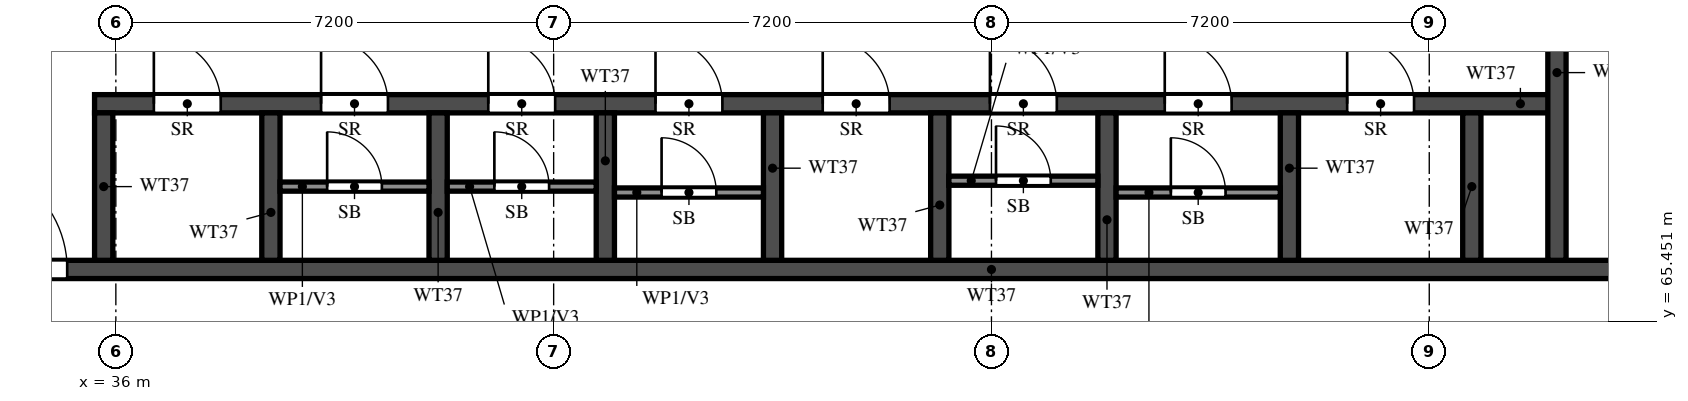
"""IFC4 building model, lengths in metres.
Left out: names, types, materials, properties, quantities, classifications, styles, units other than length and angle.
Written with IfcOpenShell. Run it as: python <this file> out.ifc"""

import sys

from ifc_helpers import new_model, si_unit, direction, frame, frame_2d, origin, place, context, subcontext, project, spatial, rectangle, extrude, element, fill, save


model = new_model("IFC4")
c1 = context("Model", 3, precision=1e-05, world=origin(), true_north=direction((0.0, 1.0)))
c2 = subcontext(c1, "Body", "Model", "MODEL_VIEW")
j1 = project(units=[si_unit("LENGTHUNIT", "METRE"), si_unit("PLANEANGLEUNIT", "RADIAN")], contexts=[c1])
p1 = place(None, origin())
s1 = spatial("IfcSite", under=j1, at=p1, CompositionType="ELEMENT")
p2 = place(p1, origin())
s2 = spatial("IfcBuilding", under=s1, at=p2, CompositionType="ELEMENT")
p3 = place(p2, frame((0.0, 0.0, 215.0)))
s3 = spatial("IfcBuildingStorey", under=s2, at=p3, CompositionType="ELEMENT", Elevation=215.0)
p4 = place(p3, frame((29.2, 66.3, 0.0), z_axis=(0.0, 0.0, 1.0), x_axis=(1.0, 0.0, 0.0)))
e1 = element("IfcWall", 1, at=p4, inside=s3, PredefinedType="SHEAR", context=c2, shape_type="SweptSolid", body=[
    extrude(rectangle(XDim=42.4, YDim=0.3, at=frame_2d((21.2, 0.0))), origin(), (0.0, 0.0, 1.0), 3.22),
])
p5 = place(p4, frame((1.425, 0.0, 0.0)))
e2 = element("IfcOpeningElement", 2, at=p5, cuts=e1, PredefinedType="OPENING", context=c2, shape_type="SweptSolid", body=[
    extrude(rectangle(XDim=1.1, YDim=2.1, at=frame_2d((0.55, 1.05))), frame((0.0, 0.16, 0.0), z_axis=(0.0, -1.0, 0.0), x_axis=(1.0, 0.0, 0.0)), (0.0, 0.0, 1.0), 0.32),
])
p6 = place(p4, frame((4.2, 0.0, 0.0)))
e3 = element("IfcOpeningElement", 3, at=p6, cuts=e1, PredefinedType="OPENING", context=c2, shape_type="SweptSolid", body=[
    extrude(rectangle(XDim=1.8, YDim=2.1, at=frame_2d((0.9, 1.05))), frame((0.0, 0.16, 0.0), z_axis=(0.0, -1.0, 0.0), x_axis=(1.0, 0.0, 0.0)), (0.0, 0.0, 1.0), 0.32),
])
p7 = place(p3, frame((35.65, 69.025, 0.0), z_axis=(0.0, 0.0, 1.0), x_axis=(1.0, 0.0, 0.0)))
e4 = element("IfcWall", 4, at=p7, inside=s3, PredefinedType="SHEAR", context=c2, shape_type="SweptSolid", body=[
    extrude(rectangle(XDim=24.05, YDim=0.3, at=frame_2d((12.025, 0.0))), origin(), (0.0, 0.0, 1.0), 3.22),
])
p8 = place(p7, frame((0.975, 0.0, 0.0)))
e5 = element("IfcOpeningElement", 5, at=p8, cuts=e4, PredefinedType="OPENING", context=c2, shape_type="SweptSolid", body=[
    extrude(rectangle(XDim=1.1, YDim=2.1, at=frame_2d((0.55, 1.05))), frame((0.0, 0.16, 0.0), z_axis=(0.0, -1.0, 0.0), x_axis=(1.0, 0.0, 0.0)), (0.0, 0.0, 1.0), 0.32),
])
p9 = place(p7, frame((3.725, 0.0, 0.0)))
e6 = element("IfcOpeningElement", 6, at=p9, cuts=e4, PredefinedType="OPENING", context=c2, shape_type="SweptSolid", body=[
    extrude(rectangle(XDim=1.1, YDim=2.1, at=frame_2d((0.55, 1.05))), frame((0.0, 0.16, 0.0), z_axis=(0.0, -1.0, 0.0), x_axis=(1.0, 0.0, 0.0)), (0.0, 0.0, 1.0), 0.32),
])
p10 = place(p7, frame((6.475, 0.0, 0.0)))
e7 = element("IfcOpeningElement", 7, at=p10, cuts=e4, PredefinedType="OPENING", context=c2, shape_type="SweptSolid", body=[
    extrude(rectangle(XDim=1.1, YDim=2.1, at=frame_2d((0.55, 1.05))), frame((0.0, 0.16, 0.0), z_axis=(0.0, -1.0, 0.0), x_axis=(1.0, 0.0, 0.0)), (0.0, 0.0, 1.0), 0.32),
])
p11 = place(p7, frame((9.225, 0.0, 0.0)))
e8 = element("IfcOpeningElement", 8, at=p11, cuts=e4, PredefinedType="OPENING", context=c2, shape_type="SweptSolid", body=[
    extrude(rectangle(XDim=1.1, YDim=2.1, at=frame_2d((0.55, 1.05))), frame((0.0, 0.16, 0.0), z_axis=(0.0, -1.0, 0.0), x_axis=(1.0, 0.0, 0.0)), (0.0, 0.0, 1.0), 0.32),
])
p12 = place(p7, frame((11.975, 0.0, 0.0)))
e9 = element("IfcOpeningElement", 9, at=p12, cuts=e4, PredefinedType="OPENING", context=c2, shape_type="SweptSolid", body=[
    extrude(rectangle(XDim=1.1, YDim=2.1, at=frame_2d((0.55, 1.05))), frame((0.0, 0.16, 0.0), z_axis=(0.0, -1.0, 0.0), x_axis=(1.0, 0.0, 0.0)), (0.0, 0.0, 1.0), 0.32),
])
p13 = place(p7, frame((14.725, 0.0, 0.0)))
e10 = element("IfcOpeningElement", 10, at=p13, cuts=e4, PredefinedType="OPENING", context=c2, shape_type="SweptSolid", body=[
    extrude(rectangle(XDim=1.1, YDim=2.1, at=frame_2d((0.55, 1.05))), frame((0.0, 0.16, 0.0), z_axis=(0.0, -1.0, 0.0), x_axis=(1.0, 0.0, 0.0)), (0.0, 0.0, 1.0), 0.32),
])
p14 = place(p7, frame((17.6, 0.0, 0.0)))
e11 = element("IfcOpeningElement", 11, at=p14, cuts=e4, PredefinedType="OPENING", context=c2, shape_type="SweptSolid", body=[
    extrude(rectangle(XDim=1.1, YDim=2.1, at=frame_2d((0.55, 1.05))), frame((0.0, 0.16, 0.0), z_axis=(0.0, -1.0, 0.0), x_axis=(1.0, 0.0, 0.0)), (0.0, 0.0, 1.0), 0.32),
])
p15 = place(p7, frame((20.6, 0.0, 0.0)))
e12 = element("IfcOpeningElement", 12, at=p15, cuts=e4, PredefinedType="OPENING", context=c2, shape_type="SweptSolid", body=[
    extrude(rectangle(XDim=1.1, YDim=2.1, at=frame_2d((0.55, 1.05))), frame((0.0, 0.16, 0.0), z_axis=(0.0, -1.0, 0.0), x_axis=(1.0, 0.0, 0.0)), (0.0, 0.0, 1.0), 0.32),
])
p16 = place(p3, frame((59.7, 66.45, 0.0), z_axis=(0.0, 0.0, 1.0), x_axis=(0.0, 1.0, 0.0)))
e13 = element("IfcWall", 13, at=p16, inside=s3, PredefinedType="SHEAR", context=c2, shape_type="SweptSolid", body=[
    extrude(rectangle(XDim=6.175, YDim=0.3, at=frame_2d((3.087, 0.0))), origin(), (0.0, 0.0, 1.0), 3.22),
])
p17 = place(p16, frame((3.85, 0.0, 0.0)))
e14 = element("IfcOpeningElement", 14, at=p17, cuts=e13, PredefinedType="OPENING", context=c2, shape_type="SweptSolid", body=[
    extrude(rectangle(XDim=1.2, YDim=2.1, at=frame_2d((0.6, 1.05))), frame((0.0, 0.16, 0.0), z_axis=(0.0, -1.0, 0.0), x_axis=(1.0, 0.0, 0.0)), (0.0, 0.0, 1.0), 0.32),
])
for number, where, z_axis, x_axis in (
    (15, (35.8, 66.45, 0.0), (0.0, 0.0, 1.0), (0.0, 1.0, 0.0)),
    (16, (38.55, 66.45, 0.0), (0.0, 0.0, 1.0), (0.0, 1.0, 0.0)),
    (17, (41.3, 66.45, 0.0), (0.0, 0.0, 1.0), (0.0, 1.0, 0.0)),
    (18, (44.05, 66.45, 0.0), (0.0, 0.0, 1.0), (0.0, 1.0, 0.0)),
    (19, (46.8, 66.45, 0.0), (0.0, 0.0, 1.0), (0.0, 1.0, 0.0)),
    (20, (49.55, 66.45, 0.0), (0.0, 0.0, 1.0), (0.0, 1.0, 0.0)),
    (21, (52.3, 66.45, 0.0), (0.0, 0.0, 1.0), (0.0, 1.0, 0.0)),
    (22, (55.3, 66.45, 0.0), (0.0, 0.0, 1.0), (0.0, 1.0, 0.0)),
    (23, (58.3, 66.45, 0.0), (0.0, 0.0, 1.0), (0.0, 1.0, 0.0)),
):
    element("IfcWall", number, at=place(p3, frame(where, z_axis=z_axis, x_axis=x_axis)), inside=s3, PredefinedType="SHEAR", context=c2, shape_type="SweptSolid", body=[
        extrude(rectangle(XDim=2.425, YDim=0.3, at=frame_2d((1.212, 0.0))), origin(), (0.0, 0.0, 1.0), 3.22),
    ])
p18 = place(p3, frame((38.7, 67.663, 0.0), z_axis=(0.0, 0.0, 1.0), x_axis=(1.0, 0.0, 0.0)))
e24 = element("IfcWall", 24, at=p18, inside=s3, PredefinedType="PARTITIONING", context=c2, shape_type="SweptSolid", body=[
    extrude(rectangle(XDim=2.45, YDim=0.15, at=frame_2d((1.225, 0.0))), origin(), (0.0, 0.0, 1.0), 3.22),
])
p19 = place(p18, frame((0.775, 0.0, 0.0)))
e25 = element("IfcOpeningElement", 25, at=p19, cuts=e24, PredefinedType="OPENING", context=c2, shape_type="SweptSolid", body=[
    extrude(rectangle(XDim=0.9, YDim=2.1, at=frame_2d((0.45, 1.05))), frame((0.0, 0.085, 0.0), z_axis=(0.0, -1.0, 0.0), x_axis=(1.0, 0.0, 0.0)), (0.0, 0.0, 1.0), 0.17),
])
p20 = place(p3, frame((41.45, 67.663, 0.0), z_axis=(0.0, 0.0, 1.0), x_axis=(1.0, 0.0, 0.0)))
e26 = element("IfcWall", 26, at=p20, inside=s3, PredefinedType="PARTITIONING", context=c2, shape_type="SweptSolid", body=[
    extrude(rectangle(XDim=2.45, YDim=0.15, at=frame_2d((1.225, 0.0))), origin(), (0.0, 0.0, 1.0), 3.22),
])
p21 = place(p20, frame((0.775, 0.0, 0.0)))
e27 = element("IfcOpeningElement", 27, at=p21, cuts=e26, PredefinedType="OPENING", context=c2, shape_type="SweptSolid", body=[
    extrude(rectangle(XDim=0.9, YDim=2.1, at=frame_2d((0.45, 1.05))), frame((0.0, 0.085, 0.0), z_axis=(0.0, -1.0, 0.0), x_axis=(1.0, 0.0, 0.0)), (0.0, 0.0, 1.0), 0.17),
])
p22 = place(p3, frame((44.2, 67.565, 0.0), z_axis=(0.0, 0.0, 1.0), x_axis=(1.0, 0.0, 0.0)))
e28 = element("IfcWall", 28, at=p22, inside=s3, PredefinedType="PARTITIONING", context=c2, shape_type="SweptSolid", body=[
    extrude(rectangle(XDim=2.45, YDim=0.15, at=frame_2d((1.225, 0.0))), origin(), (0.0, 0.0, 1.0), 3.22),
])
p23 = place(p22, frame((0.775, 0.0, 0.0)))
e29 = element("IfcOpeningElement", 29, at=p23, cuts=e28, PredefinedType="OPENING", context=c2, shape_type="SweptSolid", body=[
    extrude(rectangle(XDim=0.9, YDim=2.1, at=frame_2d((0.45, 1.05))), frame((0.0, 0.085, 0.0), z_axis=(0.0, -1.0, 0.0), x_axis=(1.0, 0.0, 0.0)), (0.0, 0.0, 1.0), 0.17),
])
p24 = place(p3, frame((49.7, 67.76, 0.0), z_axis=(0.0, 0.0, 1.0), x_axis=(1.0, 0.0, 0.0)))
e30 = element("IfcWall", 30, at=p24, inside=s3, PredefinedType="PARTITIONING", context=c2, shape_type="SweptSolid", body=[
    extrude(rectangle(XDim=2.45, YDim=0.15, at=frame_2d((1.225, 0.0))), origin(), (0.0, 0.0, 1.0), 3.22),
])
p25 = place(p24, frame((0.775, 0.0, 0.0)))
e31 = element("IfcOpeningElement", 31, at=p25, cuts=e30, PredefinedType="OPENING", context=c2, shape_type="SweptSolid", body=[
    extrude(rectangle(XDim=0.9, YDim=2.1, at=frame_2d((0.45, 1.05))), frame((0.0, 0.085, 0.0), z_axis=(0.0, -1.0, 0.0), x_axis=(1.0, 0.0, 0.0)), (0.0, 0.0, 1.0), 0.17),
])
p26 = place(p3, frame((52.45, 67.565, 0.0), z_axis=(0.0, 0.0, 1.0), x_axis=(1.0, 0.0, 0.0)))
e32 = element("IfcWall", 32, at=p26, inside=s3, PredefinedType="PARTITIONING", context=c2, shape_type="SweptSolid", body=[
    extrude(rectangle(XDim=2.7, YDim=0.15, at=frame_2d((1.35, 0.0))), origin(), (0.0, 0.0, 1.0), 3.22),
])
p27 = place(p26, frame((0.9, 0.0, 0.0)))
e33 = element("IfcOpeningElement", 33, at=p27, cuts=e32, PredefinedType="OPENING", context=c2, shape_type="SweptSolid", body=[
    extrude(rectangle(XDim=0.9, YDim=2.1, at=frame_2d((0.45, 1.05))), frame((0.0, 0.085, 0.0), z_axis=(0.0, -1.0, 0.0), x_axis=(1.0, 0.0, 0.0)), (0.0, 0.0, 1.0), 0.17),
])
p28 = place(p6, origin())
e34 = element("IfcDoor", 34, at=p28, inside=s3, OperationType="DOUBLE_DOOR_SINGLE_SWING", PredefinedType="DOOR", context=c2, shape_type="SweptSolid", body=[
    extrude(rectangle(XDim=1.8, YDim=2.1, at=frame_2d((0.9, 1.05))), frame((0.0, 0.025, 0.0), z_axis=(0.0, -1.0, 0.0), x_axis=(1.0, 0.0, 0.0)), (0.0, 0.0, 1.0), 0.05),
])
fill(e3, e34)
p29 = place(p8, origin())
e35 = element("IfcDoor", 35, at=p29, inside=s3, OperationType="SINGLE_SWING_RIGHT", PredefinedType="DOOR", context=c2, shape_type="SweptSolid", body=[
    extrude(rectangle(XDim=1.1, YDim=2.1, at=frame_2d((0.55, 1.05))), frame((0.0, 0.025, 0.0), z_axis=(0.0, -1.0, 0.0), x_axis=(1.0, 0.0, 0.0)), (0.0, 0.0, 1.0), 0.05),
])
fill(e5, e35)
p30 = place(p9, origin())
e36 = element("IfcDoor", 36, at=p30, inside=s3, OperationType="SINGLE_SWING_LEFT", PredefinedType="DOOR", context=c2, shape_type="SweptSolid", body=[
    extrude(rectangle(XDim=1.1, YDim=2.1, at=frame_2d((0.55, 1.05))), frame((0.0, 0.025, 0.0), z_axis=(0.0, -1.0, 0.0), x_axis=(1.0, 0.0, 0.0)), (0.0, 0.0, 1.0), 0.05),
])
fill(e6, e36)
p31 = place(p19, origin())
e37 = element("IfcDoor", 37, at=p31, inside=s3, OperationType="SINGLE_SWING_LEFT", PredefinedType="DOOR", context=c2, shape_type="SweptSolid", body=[
    extrude(rectangle(XDim=0.9, YDim=2.1, at=frame_2d((0.45, 1.05))), frame((0.0, 0.025, 0.0), z_axis=(0.0, -1.0, 0.0), x_axis=(1.0, 0.0, 0.0)), (0.0, 0.0, 1.0), 0.05),
])
fill(e25, e37)
p32 = place(p10, origin())
e38 = element("IfcDoor", 38, at=p32, inside=s3, OperationType="SINGLE_SWING_RIGHT", PredefinedType="DOOR", context=c2, shape_type="SweptSolid", body=[
    extrude(rectangle(XDim=1.1, YDim=2.1, at=frame_2d((0.55, 1.05))), frame((0.0, 0.025, 0.0), z_axis=(0.0, -1.0, 0.0), x_axis=(1.0, 0.0, 0.0)), (0.0, 0.0, 1.0), 0.05),
])
fill(e7, e38)
p33 = place(p21, origin())
e39 = element("IfcDoor", 39, at=p33, inside=s3, OperationType="SINGLE_SWING_RIGHT", PredefinedType="DOOR", context=c2, shape_type="SweptSolid", body=[
    extrude(rectangle(XDim=0.9, YDim=2.1, at=frame_2d((0.45, 1.05))), frame((0.0, 0.025, 0.0), z_axis=(0.0, -1.0, 0.0), x_axis=(1.0, 0.0, 0.0)), (0.0, 0.0, 1.0), 0.05),
])
fill(e27, e39)
p34 = place(p11, origin())
e40 = element("IfcDoor", 40, at=p34, inside=s3, OperationType="SINGLE_SWING_LEFT", PredefinedType="DOOR", context=c2, shape_type="SweptSolid", body=[
    extrude(rectangle(XDim=1.1, YDim=2.1, at=frame_2d((0.55, 1.05))), frame((0.0, 0.025, 0.0), z_axis=(0.0, -1.0, 0.0), x_axis=(1.0, 0.0, 0.0)), (0.0, 0.0, 1.0), 0.05),
])
fill(e8, e40)
p35 = place(p23, origin())
e41 = element("IfcDoor", 41, at=p35, inside=s3, OperationType="SINGLE_SWING_LEFT", PredefinedType="DOOR", context=c2, shape_type="SweptSolid", body=[
    extrude(rectangle(XDim=0.9, YDim=2.1, at=frame_2d((0.45, 1.05))), frame((0.0, 0.025, 0.0), z_axis=(0.0, -1.0, 0.0), x_axis=(1.0, 0.0, 0.0)), (0.0, 0.0, 1.0), 0.05),
])
fill(e29, e41)
p36 = place(p12, origin())
e42 = element("IfcDoor", 42, at=p36, inside=s3, OperationType="SINGLE_SWING_RIGHT", PredefinedType="DOOR", context=c2, shape_type="SweptSolid", body=[
    extrude(rectangle(XDim=1.1, YDim=2.1, at=frame_2d((0.55, 1.05))), frame((0.0, 0.025, 0.0), z_axis=(0.0, -1.0, 0.0), x_axis=(1.0, 0.0, 0.0)), (0.0, 0.0, 1.0), 0.05),
])
fill(e9, e42)
p37 = place(p13, origin())
e43 = element("IfcDoor", 43, at=p37, inside=s3, OperationType="SINGLE_SWING_LEFT", PredefinedType="DOOR", context=c2, shape_type="SweptSolid", body=[
    extrude(rectangle(XDim=1.1, YDim=2.1, at=frame_2d((0.55, 1.05))), frame((0.0, 0.025, 0.0), z_axis=(0.0, -1.0, 0.0), x_axis=(1.0, 0.0, 0.0)), (0.0, 0.0, 1.0), 0.05),
])
fill(e10, e43)
p38 = place(p25, origin())
e44 = element("IfcDoor", 44, at=p38, inside=s3, OperationType="SINGLE_SWING_RIGHT", PredefinedType="DOOR", context=c2, shape_type="SweptSolid", body=[
    extrude(rectangle(XDim=0.9, YDim=2.1, at=frame_2d((0.45, 1.05))), frame((0.0, 0.025, 0.0), z_axis=(0.0, -1.0, 0.0), x_axis=(1.0, 0.0, 0.0)), (0.0, 0.0, 1.0), 0.05),
])
fill(e31, e44)
p39 = place(p14, origin())
e45 = element("IfcDoor", 45, at=p39, inside=s3, OperationType="SINGLE_SWING_RIGHT", PredefinedType="DOOR", context=c2, shape_type="SweptSolid", body=[
    extrude(rectangle(XDim=1.1, YDim=2.1, at=frame_2d((0.55, 1.05))), frame((0.0, 0.025, 0.0), z_axis=(0.0, -1.0, 0.0), x_axis=(1.0, 0.0, 0.0)), (0.0, 0.0, 1.0), 0.05),
])
fill(e11, e45)
p40 = place(p27, origin())
e46 = element("IfcDoor", 46, at=p40, inside=s3, OperationType="SINGLE_SWING_RIGHT", PredefinedType="DOOR", context=c2, shape_type="SweptSolid", body=[
    extrude(rectangle(XDim=0.9, YDim=2.1, at=frame_2d((0.45, 1.05))), frame((0.0, 0.025, 0.0), z_axis=(0.0, -1.0, 0.0), x_axis=(1.0, 0.0, 0.0)), (0.0, 0.0, 1.0), 0.05),
])
fill(e33, e46)
p41 = place(p15, origin())
e47 = element("IfcDoor", 47, at=p41, inside=s3, OperationType="SINGLE_SWING_RIGHT", PredefinedType="DOOR", context=c2, shape_type="SweptSolid", body=[
    extrude(rectangle(XDim=1.1, YDim=2.1, at=frame_2d((0.55, 1.05))), frame((0.0, 0.025, 0.0), z_axis=(0.0, -1.0, 0.0), x_axis=(1.0, 0.0, 0.0)), (0.0, 0.0, 1.0), 0.05),
])
fill(e12, e47)
save(model, sys.argv[1])
